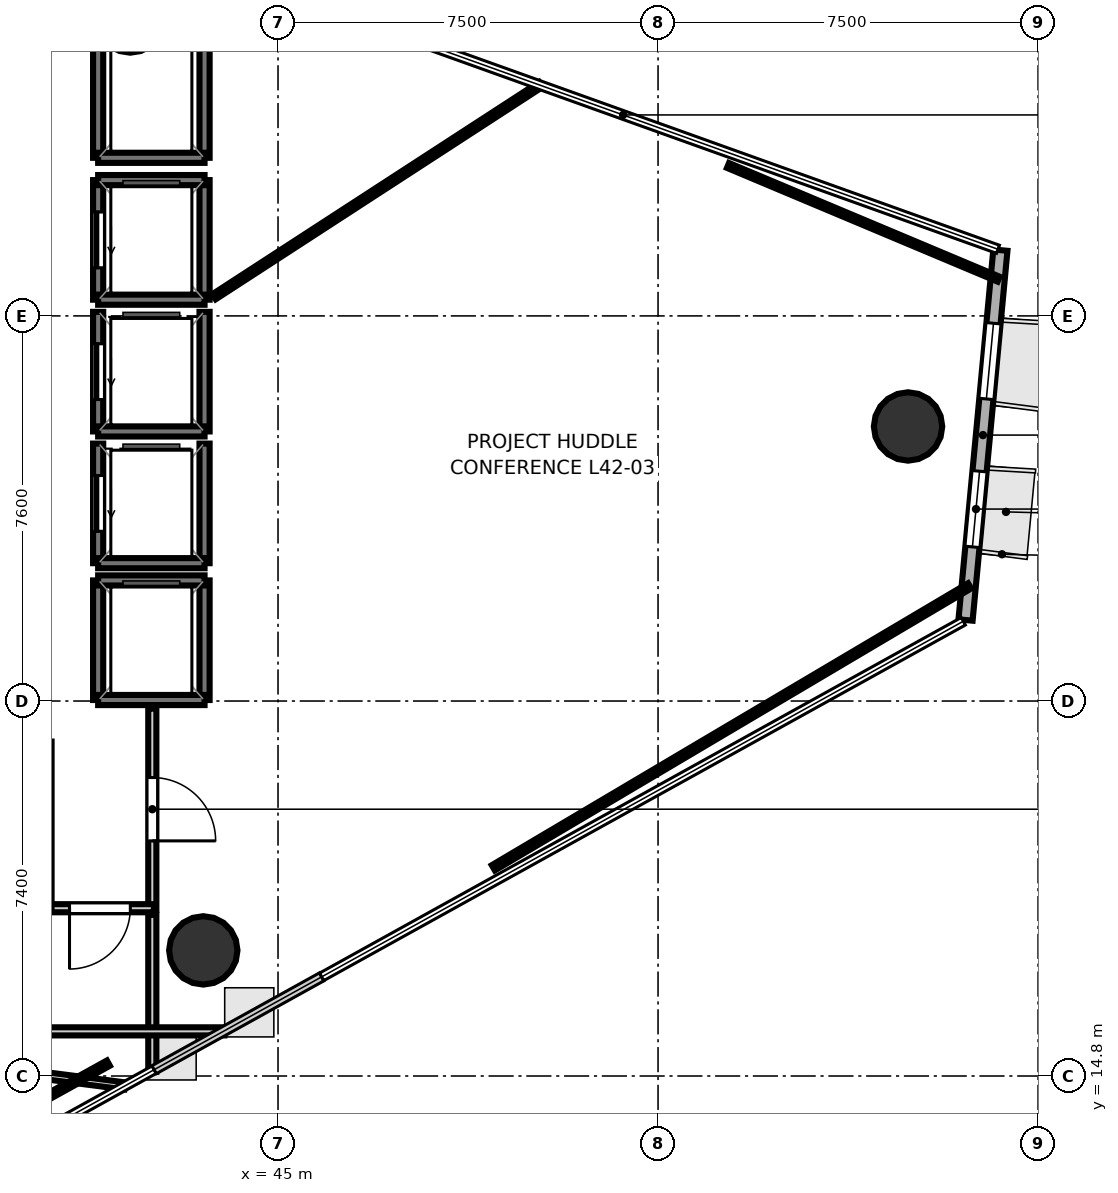
"""IFC4 building model, lengths in metres.
Left out: names, types, materials, properties, quantities, classifications, styles, units other than length and angle.
Written with IfcOpenShell. Run it as: python <this file> out.ifc"""

import sys

from ifc_helpers import new_model, si_unit, direction, frame, frame_2d, origin, origin_2d, place, context, subcontext, project, spatial, rectangle, hollow_circle, extrude, element, fill, save


model = new_model("IFC4")
c1 = context("Model", 3, precision=1e-05, world=origin(), true_north=direction((0.0, 1.0)))
c2 = subcontext(c1, "Body", "Model", "MODEL_VIEW")
j1 = project(units=[si_unit("LENGTHUNIT", "METRE"), si_unit("PLANEANGLEUNIT", "RADIAN")], contexts=[c1])
p1 = place(None, origin())
s1 = spatial("IfcSite", under=j1, at=p1, CompositionType="ELEMENT")
p2 = place(p1, origin())
s2 = spatial("IfcBuilding", under=s1, at=p2, CompositionType="ELEMENT")
p3 = place(p2, frame((0.0, 0.0, 166.1)))
s3 = spatial("IfcBuildingStorey", under=s2, at=p3, CompositionType="ELEMENT", Elevation=166.1)
for number, where, z_axis, x_axis in (
    (1, (57.434, 27.618, 0.0), (0.0, 0.0, 1.0), (1.0, 0.0, 0.0)),
    (2, (42.083, 35.669, 0.0), (0.0, 0.0, 1.0), (1.0, 0.0, 0.0)),
    (3, (43.525, 17.279, 0.0), (0.0, 0.0, 1.0), (1.0, 0.0, 0.0)),
):
    element("IfcColumn", number, at=place(p3, frame(where, z_axis=z_axis, x_axis=x_axis)), inside=s3, PredefinedType="COLUMN", context=c2, shape_type="SweptSolid", body=[
        extrude(hollow_circle(Radius=0.675, WallThickness=0.032, at=origin_2d()), origin(), (0.0, 0.0, 1.0), 3.7),
    ])
p4 = place(p3, frame((58.569, 23.798, 0.0), z_axis=(0.0, 0.0, 1.0), x_axis=(0.093801784149, 0.995590892531, 0.0)))
e4 = element("IfcWall", 4, at=p4, inside=s3, PredefinedType="SOLIDWALL", context=c2, shape_type="SweptSolid", body=[
    extrude(rectangle(XDim=7.332, YDim=0.28, at=frame_2d((3.666, 0.0))), origin(), (0.0, 0.0, 1.0), 3.52),
])
p5 = place(p4, frame((1.45, 0.0, 0.85)))
e5 = element("IfcOpeningElement", 5, at=p5, cuts=e4, PredefinedType="OPENING", context=c2, shape_type="SweptSolid", body=[
    extrude(rectangle(XDim=1.5, YDim=2.1, at=frame_2d((0.75, 1.05))), frame((0.0, 0.15, 0.0), z_axis=(0.0, -1.0, 0.0), x_axis=(1.0, 0.0, 0.0)), (0.0, 0.0, 1.0), 0.3),
])
p6 = place(p4, frame((4.382, 0.0, 0.85)))
e6 = element("IfcOpeningElement", 6, at=p6, cuts=e4, PredefinedType="OPENING", context=c2, shape_type="SweptSolid", body=[
    extrude(rectangle(XDim=1.5, YDim=2.1, at=frame_2d((0.75, 1.05))), frame((0.0, 0.15, 0.0), z_axis=(0.0, -1.0, 0.0), x_axis=(1.0, 0.0, 0.0)), (0.0, 0.0, 1.0), 0.3),
])
p7 = place(p3, frame((43.55, 30.12, 0.0), z_axis=(0.0, 0.0, 1.0), x_axis=(0.0, 1.0, 0.0)))
e7 = element("IfcWall", 7, at=p7, inside=s3, PredefinedType="SOLIDWALL", context=c2, shape_type="SweptSolid", body=[
    extrude(rectangle(XDim=2.36, YDim=0.2, at=frame_2d((1.18, 0.0))), origin(), (0.0, 0.0, 1.0), 3.52),
])
p8 = place(p3, frame((41.45, 30.12, 0.0), z_axis=(0.0, 0.0, 1.0), x_axis=(0.0, 1.0, 0.0)))
e8 = element("IfcWall", 8, at=p8, inside=s3, PredefinedType="SOLIDWALL", context=c2, shape_type="SweptSolid", body=[
    extrude(rectangle(XDim=2.36, YDim=0.2, at=frame_2d((1.18, 0.0))), origin(), (0.0, 0.0, 1.0), 3.52),
])
p9 = place(p8, frame((0.63, 0.0, 0.0)))
e9 = element("IfcOpeningElement", 9, at=p9, cuts=e8, PredefinedType="OPENING", context=c2, shape_type="SweptSolid", body=[
    extrude(rectangle(XDim=1.1, YDim=2.15, at=frame_2d((0.55, 1.075))), frame((0.0, 0.11, 0.0), z_axis=(0.0, -1.0, 0.0), x_axis=(1.0, 0.0, 0.0)), (0.0, 0.0, 1.0), 0.22),
])
for number, where, z_axis, x_axis in (
    (10, (41.45, 32.48, 0.0), (0.0, 0.0, 1.0), (1.0, 0.0, 0.0)),
    (11, (41.45, 30.12, 0.0), (0.0, 0.0, 1.0), (1.0, 0.0, 0.0)),
):
    element("IfcWall", number, at=place(p3, frame(where, z_axis=z_axis, x_axis=x_axis)), inside=s3, PredefinedType="SOLIDWALL", context=c2, shape_type="SweptSolid", body=[
        extrude(rectangle(XDim=2.1, YDim=0.2, at=frame_2d((1.05, 0.0))), origin(), (0.0, 0.0, 1.0), 3.52),
    ])
p10 = place(p3, frame((43.55, 27.52, 0.0), z_axis=(0.0, 0.0, 1.0), x_axis=(0.0, 1.0, 0.0)))
e12 = element("IfcWall", 12, at=p10, inside=s3, PredefinedType="SOLIDWALL", context=c2, shape_type="SweptSolid", body=[
    extrude(rectangle(XDim=2.36, YDim=0.2, at=frame_2d((1.18, 0.0))), origin(), (0.0, 0.0, 1.0), 3.52),
])
p11 = place(p3, frame((41.45, 27.52, 0.0), z_axis=(0.0, 0.0, 1.0), x_axis=(0.0, 1.0, 0.0)))
e13 = element("IfcWall", 13, at=p11, inside=s3, PredefinedType="SOLIDWALL", context=c2, shape_type="SweptSolid", body=[
    extrude(rectangle(XDim=2.36, YDim=0.2, at=frame_2d((1.18, 0.0))), origin(), (0.0, 0.0, 1.0), 3.52),
])
p12 = place(p11, frame((0.63, 0.0, 0.0)))
e14 = element("IfcOpeningElement", 14, at=p12, cuts=e13, PredefinedType="OPENING", context=c2, shape_type="SweptSolid", body=[
    extrude(rectangle(XDim=1.1, YDim=2.15, at=frame_2d((0.55, 1.075))), frame((0.0, 0.11, 0.0), z_axis=(0.0, -1.0, 0.0), x_axis=(1.0, 0.0, 0.0)), (0.0, 0.0, 1.0), 0.22),
])
p13 = place(p3, frame((41.45, 27.52, 0.0), z_axis=(0.0, 0.0, 1.0), x_axis=(1.0, 0.0, 0.0)))
e15 = element("IfcWall", 15, at=p13, inside=s3, PredefinedType="SOLIDWALL", context=c2, shape_type="SweptSolid", body=[
    extrude(rectangle(XDim=2.1, YDim=0.2, at=frame_2d((1.05, 0.0))), origin(), (0.0, 0.0, 1.0), 3.52),
])
p14 = place(p3, frame((43.55, 24.92, 0.0), z_axis=(0.0, 0.0, 1.0), x_axis=(0.0, 1.0, 0.0)))
e16 = element("IfcWall", 16, at=p14, inside=s3, PredefinedType="SOLIDWALL", context=c2, shape_type="SweptSolid", body=[
    extrude(rectangle(XDim=2.36, YDim=0.2, at=frame_2d((1.18, 0.0))), origin(), (0.0, 0.0, 1.0), 3.52),
])
p15 = place(p3, frame((41.45, 24.92, 0.0), z_axis=(0.0, 0.0, 1.0), x_axis=(0.0, 1.0, 0.0)))
e17 = element("IfcWall", 17, at=p15, inside=s3, PredefinedType="SOLIDWALL", context=c2, shape_type="SweptSolid", body=[
    extrude(rectangle(XDim=2.36, YDim=0.2, at=frame_2d((1.18, 0.0))), origin(), (0.0, 0.0, 1.0), 3.52),
])
p16 = place(p15, frame((0.63, 0.0, 0.0)))
e18 = element("IfcOpeningElement", 18, at=p16, cuts=e17, PredefinedType="OPENING", context=c2, shape_type="SweptSolid", body=[
    extrude(rectangle(XDim=1.1, YDim=2.15, at=frame_2d((0.55, 1.075))), frame((0.0, 0.11, 0.0), z_axis=(0.0, -1.0, 0.0), x_axis=(1.0, 0.0, 0.0)), (0.0, 0.0, 1.0), 0.22),
])
p17 = place(p3, frame((41.45, 24.92, 0.0), z_axis=(0.0, 0.0, 1.0), x_axis=(1.0, 0.0, 0.0)))
e19 = element("IfcWall", 19, at=p17, inside=s3, PredefinedType="SOLIDWALL", context=c2, shape_type="SweptSolid", body=[
    extrude(rectangle(XDim=2.1, YDim=0.2, at=frame_2d((1.05, 0.0))), origin(), (0.0, 0.0, 1.0), 3.52),
])
for number, where, z_axis, x_axis in (
    (20, (43.55, 22.22, 0.0), (0.0, 0.0, 1.0), (0.0, 1.0, 0.0)),
    (21, (41.45, 22.22, 0.0), (0.0, 0.0, 1.0), (0.0, 1.0, 0.0)),
):
    element("IfcWall", number, at=place(p3, frame(where, z_axis=z_axis, x_axis=x_axis)), inside=s3, PredefinedType="SOLIDWALL", context=c2, shape_type="SweptSolid", body=[
        extrude(rectangle(XDim=2.36, YDim=0.2, at=frame_2d((1.18, 0.0))), origin(), (0.0, 0.0, 1.0), 3.52),
    ])
for number, where, z_axis, x_axis in (
    (22, (41.45, 24.58, 0.0), (0.0, 0.0, 1.0), (1.0, 0.0, 0.0)),
    (23, (41.45, 22.22, 0.0), (0.0, 0.0, 1.0), (1.0, 0.0, 0.0)),
):
    element("IfcWall", number, at=place(p3, frame(where, z_axis=z_axis, x_axis=x_axis)), inside=s3, PredefinedType="SOLIDWALL", context=c2, shape_type="SweptSolid", body=[
        extrude(rectangle(XDim=2.1, YDim=0.2, at=frame_2d((1.05, 0.0))), origin(), (0.0, 0.0, 1.0), 3.52),
    ])
for number, where, z_axis, x_axis in (
    (24, (43.55, 32.92, 0.0), (0.0, 0.0, 1.0), (0.0, 1.0, 0.0)),
    (25, (41.45, 32.92, 0.0), (0.0, 0.0, 1.0), (0.0, 1.0, 0.0)),
):
    element("IfcWall", number, at=place(p3, frame(where, z_axis=z_axis, x_axis=x_axis)), inside=s3, PredefinedType="SOLIDWALL", context=c2, shape_type="SweptSolid", body=[
        extrude(rectangle(XDim=2.36, YDim=0.2, at=frame_2d((1.18, 0.0))), origin(), (0.0, 0.0, 1.0), 3.52),
    ])
p18 = place(p3, frame((41.45, 32.92, 0.0), z_axis=(0.0, 0.0, 1.0), x_axis=(1.0, 0.0, 0.0)))
e26 = element("IfcWall", 26, at=p18, inside=s3, PredefinedType="SOLIDWALL", context=c2, shape_type="SweptSolid", body=[
    extrude(rectangle(XDim=2.1, YDim=0.2, at=frame_2d((1.05, 0.0))), origin(), (0.0, 0.0, 1.0), 3.52),
])
p19 = place(p3, frame((42.519, 22.05, 0.0), z_axis=(0.0, 0.0, 1.0), x_axis=(0.0, -1.0, 0.0)))
e27 = element("IfcWall", 27, at=p19, inside=s3, PredefinedType="PARTITIONING", context=c2, shape_type="SweptSolid", body=[
    extrude(rectangle(XDim=3.97, YDim=0.16, at=frame_2d((1.985, 0.0))), origin(), (0.0, 0.0, 1.0), 2.84),
])
p20 = place(p19, frame((1.36, 0.0, 0.0)))
e28 = element("IfcOpeningElement", 28, at=p20, cuts=e27, PredefinedType="OPENING", context=c2, shape_type="SweptSolid", body=[
    extrude(rectangle(XDim=1.25, YDim=2.2, at=frame_2d((0.625, 1.1))), frame((0.0, 0.09, 0.0), z_axis=(0.0, -1.0, 0.0), x_axis=(1.0, 0.0, 0.0)), (0.0, 0.0, 1.0), 0.18),
])
p21 = place(p3, frame((42.55, 18.111, 0.0), z_axis=(0.0, 0.0, 1.0), x_axis=(-1.0, 0.0, 0.0)))
e29 = element("IfcWall", 29, at=p21, inside=s3, PredefinedType="PARTITIONING", context=c2, shape_type="SweptSolid", body=[
    extrude(rectangle(XDim=2.13, YDim=0.16, at=frame_2d((1.065, 0.0))), origin(), (0.0, 0.0, 1.0), 2.84),
])
p22 = place(p21, frame((0.465, 0.0, 0.0)))
e30 = element("IfcOpeningElement", 30, at=p22, cuts=e29, PredefinedType="OPENING", context=c2, shape_type="SweptSolid", body=[
    extrude(rectangle(XDim=1.2, YDim=2.15, at=frame_2d((0.6, 1.075))), frame((0.0, 0.09, 0.0), z_axis=(0.0, -1.0, 0.0), x_axis=(1.0, 0.0, 0.0)), (0.0, 0.0, 1.0), 0.18),
])
p23 = place(p3, frame((42.519, 17.98, 0.0), z_axis=(0.0, 0.0, 1.0), x_axis=(0.0, -1.0, 0.0)))
e31 = element("IfcWall", 31, at=p23, inside=s3, PredefinedType="PARTITIONING", context=c2, shape_type="SweptSolid", body=[
    extrude(rectangle(XDim=3.095, YDim=0.16, at=frame_2d((1.548, 0.0))), origin(), (0.0, 0.0, 1.0), 2.84),
])
p24 = place(p3, frame((43.94, 15.681, 0.0), z_axis=(0.0, 0.0, 1.0), x_axis=(-1.0, 0.0, 0.0)))
e32 = element("IfcWall", 32, at=p24, inside=s3, PredefinedType="PARTITIONING", context=c2, shape_type="SweptSolid", body=[
    extrude(rectangle(XDim=15.54, YDim=0.16, at=frame_2d((7.77, 0.0))), origin(), (0.0, 0.0, 1.0), 2.84),
])
p25 = place(p24, frame((4.925, 0.0, 0.0)))
e33 = element("IfcOpeningElement", 33, at=p25, cuts=e32, PredefinedType="OPENING", context=c2, shape_type="SweptSolid", body=[
    extrude(rectangle(XDim=1.25, YDim=2.2, at=frame_2d((0.625, 1.1))), frame((0.0, 0.09, 0.0), z_axis=(0.0, -1.0, 0.0), x_axis=(1.0, 0.0, 0.0)), (0.0, 0.0, 1.0), 0.18),
])
p26 = place(p3, frame((35.506, 15.441, 0.0), z_axis=(0.0, 0.0, 1.0), x_axis=(0.991738600058, -0.128275286609, 0.0)))
e34 = element("IfcWall", 34, at=p26, inside=s3, PredefinedType="PARTITIONING", context=c2, shape_type="SweptSolid", body=[
    extrude(rectangle(XDim=6.524, YDim=0.14, at=frame_2d((3.262, 0.0))), origin(), (0.0, 0.0, 1.0), 2.84),
])
p27 = place(p3, frame((41.652, 15.054, 0.0), z_axis=(0.0, 0.0, 1.0), x_axis=(-0.874683741707, -0.484694080832, 0.0)))
e35 = element("IfcWall", 35, at=p27, inside=s3, PredefinedType="PARTITIONING", context=c2, shape_type="SweptSolid", body=[
    extrude(rectangle(XDim=9.484, YDim=0.12, at=frame_2d((4.742, 0.0))), origin(), (0.0, 0.0, 1.0), 2.84),
])
p28 = place(p3, frame((43.737, 30.178, 0.0), z_axis=(0.0, 0.0, 1.0), x_axis=(0.838677877455, 0.544627779192, 0.0)))
e36 = element("IfcWall", 36, at=p28, inside=s3, PredefinedType="PARTITIONING", context=c2, shape_type="SweptSolid", body=[
    extrude(rectangle(XDim=7.688, YDim=0.12, at=frame_2d((3.844, 0.0))), origin(), (0.0, 0.0, 1.0), 2.84),
])
p29 = place(p3, frame((53.88, 32.769, 0.0), z_axis=(0.0, 0.0, 1.0), x_axis=(0.92192462752, -0.387369308505, 0.0)))
e37 = element("IfcWall", 37, at=p29, inside=s3, PredefinedType="PARTITIONING", context=c2, shape_type="SweptSolid", body=[
    extrude(rectangle(XDim=5.794, YDim=0.105, at=frame_2d((2.897, 0.0))), origin(), (0.0, 0.0, 1.0), 2.84),
])
p30 = place(p3, frame((58.649, 24.473, 0.0), z_axis=(0.0, 0.0, 1.0), x_axis=(-0.860528893232, -0.509401633205, 0.0)))
e38 = element("IfcWall", 38, at=p30, inside=s3, PredefinedType="PARTITIONING", context=c2, shape_type="SweptSolid", body=[
    extrude(rectangle(XDim=10.923, YDim=0.12, at=frame_2d((5.461, 0.0))), origin(), (0.0, 0.0, 1.0), 2.84),
])
p31 = place(p9, origin())
e39 = element("IfcDoor", 39, at=p31, inside=s3, OperationType="SLIDING_TO_LEFT", PredefinedType="DOOR", context=c2, shape_type="SweptSolid", body=[
    extrude(rectangle(XDim=1.1, YDim=2.15, at=frame_2d((0.55, 1.075))), frame((0.0, 0.025, 0.0), z_axis=(0.0, -1.0, 0.0), x_axis=(1.0, 0.0, 0.0)), (0.0, 0.0, 1.0), 0.05),
])
fill(e9, e39)
p32 = place(p12, origin())
e40 = element("IfcDoor", 40, at=p32, inside=s3, OperationType="SLIDING_TO_LEFT", PredefinedType="DOOR", context=c2, shape_type="SweptSolid", body=[
    extrude(rectangle(XDim=1.1, YDim=2.15, at=frame_2d((0.55, 1.075))), frame((0.0, 0.025, 0.0), z_axis=(0.0, -1.0, 0.0), x_axis=(1.0, 0.0, 0.0)), (0.0, 0.0, 1.0), 0.05),
])
fill(e14, e40)
p33 = place(p16, origin())
e41 = element("IfcDoor", 41, at=p33, inside=s3, OperationType="SLIDING_TO_LEFT", PredefinedType="DOOR", context=c2, shape_type="SweptSolid", body=[
    extrude(rectangle(XDim=1.1, YDim=2.15, at=frame_2d((0.55, 1.075))), frame((0.0, 0.025, 0.0), z_axis=(0.0, -1.0, 0.0), x_axis=(1.0, 0.0, 0.0)), (0.0, 0.0, 1.0), 0.05),
])
fill(e18, e41)
p34 = place(p22, origin())
e42 = element("IfcDoor", 42, at=p34, inside=s3, OperationType="SINGLE_SWING_RIGHT", PredefinedType="DOOR", context=c2, shape_type="SweptSolid", body=[
    extrude(rectangle(XDim=1.2, YDim=2.15, at=frame_2d((0.6, 1.075))), frame((0.0, 0.025, 0.0), z_axis=(0.0, -1.0, 0.0), x_axis=(1.0, 0.0, 0.0)), (0.0, 0.0, 1.0), 0.05),
])
fill(e30, e42)
p35 = place(p20, origin())
e43 = element("IfcDoor", 43, at=p35, inside=s3, OperationType="SINGLE_SWING_RIGHT", PredefinedType="DOOR", context=c2, shape_type="SweptSolid", body=[
    extrude(rectangle(XDim=1.25, YDim=2.2, at=frame_2d((0.625, 1.1))), frame((0.0, 0.025, 0.0), z_axis=(0.0, -1.0, 0.0), x_axis=(1.0, 0.0, 0.0)), (0.0, 0.0, 1.0), 0.05),
])
fill(e28, e43)
p36 = place(p5, origin())
e44 = element("IfcWindow", 44, at=p36, inside=s3, PartitioningType="SINGLE_PANEL", PredefinedType="WINDOW", context=c2, shape_type="SweptSolid", body=[
    extrude(rectangle(XDim=1.5, YDim=2.1, at=frame_2d((0.75, 1.05))), frame((0.0, 0.03, 0.0), z_axis=(0.0, -1.0, 0.0), x_axis=(1.0, 0.0, 0.0)), (0.0, 0.0, 1.0), 0.06),
])
fill(e5, e44)
p37 = place(p6, origin())
e45 = element("IfcWindow", 45, at=p37, inside=s3, PartitioningType="SINGLE_PANEL", PredefinedType="WINDOW", context=c2, shape_type="SweptSolid", body=[
    extrude(rectangle(XDim=1.5, YDim=2.1, at=frame_2d((0.75, 1.05))), frame((0.0, 0.03, 0.0), z_axis=(0.0, -1.0, 0.0), x_axis=(1.0, 0.0, 0.0)), (0.0, 0.0, 1.0), 0.06),
])
fill(e6, e45)
save(model, sys.argv[1])
